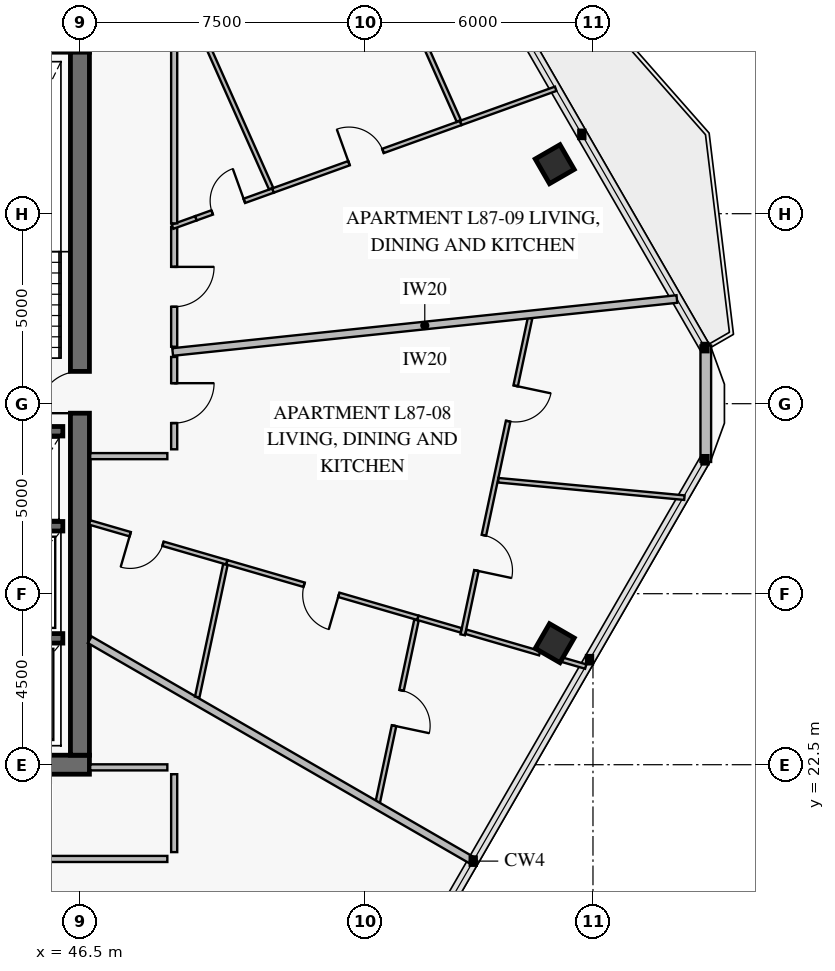
"""IFC4 building model, lengths in metres.
Left out: names, types, materials, properties, quantities, classifications, styles, units other than length and angle.
Written with IfcOpenShell. Run it as: python <this file> out.ifc"""

import sys

from ifc_helpers import new_model, si_unit, direction, frame, frame_2d, origin, origin_2d, place, context, subcontext, project, spatial, rectangle, extrude, element, fill, save


model = new_model("IFC4")
c1 = context("Model", 3, precision=1e-05, world=origin(), true_north=direction((0.0, 1.0)))
c2 = subcontext(c1, "Body", "Model", "MODEL_VIEW")
j1 = project(units=[si_unit("LENGTHUNIT", "METRE"), si_unit("PLANEANGLEUNIT", "RADIAN")], contexts=[c1])
p1 = place(None, origin())
s1 = spatial("IfcSite", under=j1, at=p1, CompositionType="ELEMENT")
p2 = place(p1, origin())
s2 = spatial("IfcBuilding", under=s1, at=p2, CompositionType="ELEMENT")
p3 = place(p2, frame((0.0, 0.0, 342.4)))
s3 = spatial("IfcBuildingStorey", under=s2, at=p3, CompositionType="ELEMENT", Elevation=342.4)
p4 = place(p3, frame((37.35, 22.5, 0.0), z_axis=(0.0, 0.0, 1.0), x_axis=(1.0, 0.0, 0.0)))
e1 = element("IfcWall", 1, at=p4, inside=s3, PredefinedType="SHEAR", context=c2, shape_type="SweptSolid", body=[
    extrude(rectangle(XDim=9.4, YDim=0.5, at=frame_2d((4.7, 0.0))), origin(), (0.0, 0.0, 1.0), 3.8),
])
p5 = place(p4, frame((3.95, 0.0, 0.0)))
e2 = element("IfcOpeningElement", 2, at=p5, cuts=e1, PredefinedType="OPENING", context=c2, shape_type="SweptSolid", body=[
    extrude(rectangle(XDim=1.5, YDim=2.15, at=frame_2d((0.75, 1.075))), frame((0.0, 0.262, 0.0), z_axis=(0.0, -1.0, 0.0), x_axis=(1.0, 0.0, 0.0)), (0.0, 0.0, 1.0), 0.524),
])
p6 = place(p3, frame((46.75, 41.5, 0.0), z_axis=(0.0, 0.0, 1.0), x_axis=(-1.0, 0.0, 0.0)))
e3 = element("IfcWall", 3, at=p6, inside=s3, PredefinedType="SHEAR", context=c2, shape_type="SweptSolid", body=[
    extrude(rectangle(XDim=7.8, YDim=0.5, at=frame_2d((3.9, 0.0))), origin(), (0.0, 0.0, 1.0), 3.8),
])
p7 = place(p3, frame((46.5, 22.75, 0.0), z_axis=(0.0, 0.0, 1.0), x_axis=(0.0, 1.0, 0.0)))
e4 = element("IfcWall", 4, at=p7, inside=s3, PredefinedType="SHEAR", context=c2, shape_type="SweptSolid", body=[
    extrude(rectangle(XDim=18.5, YDim=0.5, at=frame_2d((9.25, 0.0))), origin(), (0.0, 0.0, 1.0), 3.8),
])
p8 = place(p7, frame((9.0, 0.0, 0.0)))
e5 = element("IfcOpeningElement", 5, at=p8, cuts=e4, PredefinedType="OPENING", context=c2, shape_type="SweptSolid", body=[
    extrude(rectangle(XDim=1.1, YDim=2.15, at=frame_2d((0.55, 1.075))), frame((0.0, 0.262, 0.0), z_axis=(0.0, -1.0, 0.0), x_axis=(1.0, 0.0, 0.0)), (0.0, 0.0, 1.0), 0.524),
])
for number, where, z_axis, x_axis in (
    (6, (58.993, 38.302, 0.0), (0.0, 0.0, 1.0), (-0.5, 0.866, 0.0)),
    (7, (58.993, 25.698, 0.0), (0.0, 0.0, 1.0), (0.5, 0.866, 0.0)),
):
    element("IfcColumn", number, at=place(p3, frame(where, z_axis=z_axis, x_axis=x_axis)), inside=s3, PredefinedType="COLUMN", context=c2, shape_type="SweptSolid", body=[
        extrude(rectangle(XDim=0.75, YDim=0.75, at=origin_2d()), origin(), (0.0, 0.0, 1.0), 3.55),
    ])
p9 = place(p3, frame((62.969, 33.532, 0.0), z_axis=(0.0, 0.0, 1.0), x_axis=(0.0, -1.0, 0.0)))
e8 = element("IfcWall", 8, at=p9, inside=s3, PredefinedType="SOLIDWALL", context=c2, shape_type="SweptSolid", body=[
    extrude(rectangle(XDim=3.065, YDim=0.28, at=frame_2d((1.532, 0.0))), origin(), (0.0, 0.0, 1.0), 3.55),
])
p10 = place(p3, frame((25.95, 31.275, 0.0), z_axis=(0.0, 0.0, 1.0), x_axis=(1.0, 0.0, 0.0)))
e9 = element("IfcWall", 9, at=p10, inside=s3, PredefinedType="SOLIDWALL", context=c2, shape_type="SweptSolid", body=[
    extrude(rectangle(XDim=20.1, YDim=0.25, at=frame_2d((10.05, 0.0))), origin(), (0.0, 0.0, 1.0), 3.8),
])
p11 = place(p10, frame((2.6, 0.0, 0.0)))
e10 = element("IfcOpeningElement", 10, at=p11, cuts=e9, PredefinedType="OPENING", context=c2, shape_type="SweptSolid", body=[
    extrude(rectangle(XDim=1.1, YDim=2.15, at=frame_2d((0.55, 1.075))), frame((0.0, 0.137, 0.0), z_axis=(0.0, -1.0, 0.0), x_axis=(1.0, 0.0, 0.0)), (0.0, 0.0, 1.0), 0.274),
])
p12 = place(p10, frame((10.6, 0.0, 0.0)))
e11 = element("IfcOpeningElement", 11, at=p12, cuts=e9, PredefinedType="OPENING", context=c2, shape_type="SweptSolid", body=[
    extrude(rectangle(XDim=1.1, YDim=2.15, at=frame_2d((0.55, 1.075))), frame((0.0, 0.137, 0.0), z_axis=(0.0, -1.0, 0.0), x_axis=(1.0, 0.0, 0.0)), (0.0, 0.0, 1.0), 0.274),
])
p13 = place(p10, frame((16.35, 0.0, 0.0)))
e12 = element("IfcOpeningElement", 12, at=p13, cuts=e9, PredefinedType="OPENING", context=c2, shape_type="SweptSolid", body=[
    extrude(rectangle(XDim=1.1, YDim=2.15, at=frame_2d((0.55, 1.075))), frame((0.0, 0.137, 0.0), z_axis=(0.0, -1.0, 0.0), x_axis=(1.0, 0.0, 0.0)), (0.0, 0.0, 1.0), 0.274),
])
for number, where, z_axis, x_axis in (
    (13, (43.8, 25.825, 0.0), (0.0, 0.0, 1.0), (1.0, 0.0, 0.0)),
    (14, (43.8, 28.775, 0.0), (0.0, 0.0, 1.0), (1.0, 0.0, 0.0)),
):
    element("IfcWall", number, at=place(p3, frame(where, z_axis=z_axis, x_axis=x_axis)), inside=s3, PredefinedType="SOLIDWALL", context=c2, shape_type="SweptSolid", body=[
        extrude(rectangle(XDim=2.25, YDim=0.25, at=frame_2d((1.125, 0.0))), origin(), (0.0, 0.0, 1.0), 3.8),
    ])
p14 = place(p3, frame((41.356, 20.02, 0.0), z_axis=(0.0, 0.0, 1.0), x_axis=(1.0, 0.0, 0.0)))
e15 = element("IfcWall", 15, at=p14, inside=s3, PredefinedType="PARTITIONING", context=c2, shape_type="SweptSolid", body=[
    extrude(rectangle(XDim=7.444, YDim=0.16, at=frame_2d((3.722, 0.0))), origin(), (0.0, 0.0, 1.0), 3.0),
])
p15 = place(p14, frame((3.147, 0.0, 0.0)))
e16 = element("IfcOpeningElement", 16, at=p15, cuts=e15, PredefinedType="OPENING", context=c2, shape_type="SweptSolid", body=[
    extrude(rectangle(XDim=1.15, YDim=2.2, at=frame_2d((0.575, 1.1))), frame((0.0, 0.092, 0.0), z_axis=(0.0, -1.0, 0.0), x_axis=(1.0, 0.0, 0.0)), (0.0, 0.0, 1.0), 0.184),
])
p16 = place(p3, frame((56.573, 25.919, 0.0), z_axis=(0.0, 0.0, 1.0), x_axis=(0.207884804538, 0.978153315203, 0.0)))
e17 = element("IfcWall", 17, at=p16, inside=s3, PredefinedType="PARTITIONING", context=c2, shape_type="SweptSolid", body=[
    extrude(rectangle(XDim=8.519, YDim=0.12, at=frame_2d((4.26, 0.0))), origin(), (0.0, 0.0, 1.0), 3.0),
])
p17 = place(p16, frame((1.728, 0.0, 0.0)))
e18 = element("IfcOpeningElement", 18, at=p17, cuts=e17, PredefinedType="OPENING", context=c2, shape_type="SweptSolid", body=[
    extrude(rectangle(XDim=0.95, YDim=2.1, at=frame_2d((0.475, 1.05))), frame((0.0, 0.072, 0.0), z_axis=(0.0, -1.0, 0.0), x_axis=(1.0, 0.0, 0.0)), (0.0, 0.0, 1.0), 0.144),
])
p18 = place(p16, frame((5.747, 0.0, 0.0)))
e19 = element("IfcOpeningElement", 19, at=p18, cuts=e17, PredefinedType="OPENING", context=c2, shape_type="SweptSolid", body=[
    extrude(rectangle(XDim=0.95, YDim=2.1, at=frame_2d((0.475, 1.05))), frame((0.0, 0.072, 0.0), z_axis=(0.0, -1.0, 0.0), x_axis=(1.0, 0.0, 0.0)), (0.0, 0.0, 1.0), 0.144),
])
p19 = place(p3, frame((46.758, 28.875, 0.0), z_axis=(0.0, 0.0, 1.0), x_axis=(0.960290635707, -0.279001603891, 0.0)))
e20 = element("IfcWall", 20, at=p19, inside=s3, PredefinedType="PARTITIONING", context=c2, shape_type="SweptSolid", body=[
    extrude(rectangle(XDim=3.757, YDim=0.12, at=frame_2d((1.878, 0.0))), origin(), (0.0, 0.0, 1.0), 3.0),
])
p20 = place(p19, frame((1.108, 0.0, 0.0)))
e21 = element("IfcOpeningElement", 21, at=p20, cuts=e20, PredefinedType="OPENING", context=c2, shape_type="SweptSolid", body=[
    extrude(rectangle(XDim=0.9, YDim=2.1, at=frame_2d((0.45, 1.05))), frame((0.0, 0.072, 0.0), z_axis=(0.0, -1.0, 0.0), x_axis=(1.0, 0.0, 0.0)), (0.0, 0.0, 1.0), 0.144),
])
p21 = place(p3, frame((50.365, 27.826, 0.0), z_axis=(0.0, 0.0, 1.0), x_axis=(0.960293456694, -0.278991894201, 0.0)))
e22 = element("IfcWall", 22, at=p21, inside=s3, PredefinedType="PARTITIONING", context=c2, shape_type="SweptSolid", body=[
    extrude(rectangle(XDim=5.237, YDim=0.12, at=frame_2d((2.618, 0.0))), origin(), (0.0, 0.0, 1.0), 3.2),
])
p22 = place(p21, frame((2.118, 0.0, 0.0)))
e23 = element("IfcOpeningElement", 23, at=p22, cuts=e22, PredefinedType="OPENING", context=c2, shape_type="SweptSolid", body=[
    extrude(rectangle(XDim=0.95, YDim=2.1, at=frame_2d((0.475, 1.05))), frame((0.0, 0.072, 0.0), z_axis=(0.0, -1.0, 0.0), x_axis=(1.0, 0.0, 0.0)), (0.0, 0.0, 1.0), 0.144),
])
p23 = place(p3, frame((54.336, 21.511, 0.0), z_axis=(0.0, 0.0, 1.0), x_axis=(0.207920104204, 0.978145812376, 0.0)))
e24 = element("IfcWall", 24, at=p23, inside=s3, PredefinedType="PARTITIONING", context=c2, shape_type="SweptSolid", body=[
    extrude(rectangle(XDim=4.902, YDim=0.12, at=frame_2d((2.451, 0.0))), origin(), (0.0, 0.0, 1.0), 3.55),
])
p24 = place(p23, frame((2.06, 0.0, 0.0)))
e25 = element("IfcOpeningElement", 25, at=p24, cuts=e24, PredefinedType="OPENING", context=c2, shape_type="SweptSolid", body=[
    extrude(rectangle(XDim=0.95, YDim=2.1, at=frame_2d((0.475, 1.05))), frame((0.0, 0.072, 0.0), z_axis=(0.0, -1.0, 0.0), x_axis=(1.0, 0.0, 0.0)), (0.0, 0.0, 1.0), 0.144),
])
p25 = place(p3, frame((48.98, 30.8, 0.0), z_axis=(0.0, 0.0, 1.0), x_axis=(0.0, 1.0, 0.0)))
e26 = element("IfcWall", 26, at=p25, inside=s3, PredefinedType="PARTITIONING", context=c2, shape_type="SweptSolid", body=[
    extrude(rectangle(XDim=2.43, YDim=0.16, at=frame_2d((1.215, 0.0))), origin(), (0.0, 0.0, 1.0), 3.55),
])
p26 = place(p25, frame((0.69, 0.0, 0.0)))
e27 = element("IfcOpeningElement", 27, at=p26, cuts=e26, PredefinedType="OPENING", context=c2, shape_type="SweptSolid", body=[
    extrude(rectangle(XDim=1.05, YDim=2.15, at=frame_2d((0.525, 1.075))), frame((0.0, 0.092, 0.0), z_axis=(0.0, -1.0, 0.0), x_axis=(1.0, 0.0, 0.0)), (0.0, 0.0, 1.0), 0.184),
])
p27 = place(p3, frame((49.55, 36.878, 0.0), z_axis=(0.0, 0.0, 1.0), x_axis=(0.940904714612, 0.338671401244, 0.0)))
e28 = element("IfcWall", 28, at=p27, inside=s3, PredefinedType="PARTITIONING", context=c2, shape_type="SweptSolid", body=[
    extrude(rectangle(XDim=2.158, YDim=0.12, at=frame_2d((1.079, 0.0))), origin(), (0.0, 0.0, 1.0), 3.55),
])
p28 = place(p27, frame((0.457, 0.0, 0.0)))
e29 = element("IfcOpeningElement", 29, at=p28, cuts=e28, PredefinedType="OPENING", context=c2, shape_type="SweptSolid", body=[
    extrude(rectangle(XDim=0.9, YDim=2.1, at=frame_2d((0.45, 1.05))), frame((0.0, 0.072, 0.0), z_axis=(0.0, -1.0, 0.0), x_axis=(1.0, 0.0, 0.0)), (0.0, 0.0, 1.0), 0.144),
])
p29 = place(p3, frame((51.581, 37.609, 0.0), z_axis=(0.0, 0.0, 1.0), x_axis=(0.940870812365, 0.338765574461, 0.0)))
e30 = element("IfcWall", 30, at=p29, inside=s3, PredefinedType="PARTITIONING", context=c2, shape_type="SweptSolid", body=[
    extrude(rectangle(XDim=5.25, YDim=0.12, at=frame_2d((2.625, 0.0))), origin(), (0.0, 0.0, 1.0), 3.2),
])
p30 = place(p29, frame((2.125, 0.0, 0.0)))
e31 = element("IfcOpeningElement", 31, at=p30, cuts=e30, PredefinedType="OPENING", context=c2, shape_type="SweptSolid", body=[
    extrude(rectangle(XDim=0.95, YDim=2.1, at=frame_2d((0.475, 1.05))), frame((0.0, 0.072, 0.0), z_axis=(0.0, -1.0, 0.0), x_axis=(1.0, 0.0, 0.0)), (0.0, 0.0, 1.0), 0.144),
])
p31 = place(p3, frame((56.469, 39.442, 0.0), z_axis=(0.0, 0.0, 1.0), x_axis=(-0.406736554193, 0.913545497216, 0.0)))
e32 = element("IfcWall", 32, at=p31, inside=s3, PredefinedType="PARTITIONING", context=c2, shape_type="SweptSolid", body=[
    extrude(rectangle(XDim=8.483, YDim=0.12, at=frame_2d((4.241, 0.0))), origin(), (0.0, 0.0, 1.0), 3.55),
])
p32 = place(p31, frame((2.362, 0.0, 0.0)))
e33 = element("IfcOpeningElement", 33, at=p32, cuts=e32, PredefinedType="OPENING", context=c2, shape_type="SweptSolid", body=[
    extrude(rectangle(XDim=0.95, YDim=2.1, at=frame_2d((0.475, 1.05))), frame((0.0, 0.072, 0.0), z_axis=(0.0, -1.0, 0.0), x_axis=(1.0, 0.0, 0.0)), (0.0, 0.0, 1.0), 0.144),
])
p33 = place(p3, frame((48.98, 33.499, 0.0), z_axis=(0.0, 0.0, 1.0), x_axis=(0.0, 1.0, 0.0)))
e34 = element("IfcWall", 34, at=p33, inside=s3, PredefinedType="PARTITIONING", context=c2, shape_type="SweptSolid", body=[
    extrude(rectangle(XDim=3.153, YDim=0.16, at=frame_2d((1.576, 0.0))), origin(), (0.0, 0.0, 1.0), 3.0),
])
p34 = place(p33, frame((1.052, 0.0, 0.0)))
e35 = element("IfcOpeningElement", 35, at=p34, cuts=e34, PredefinedType="OPENING", context=c2, shape_type="SweptSolid", body=[
    extrude(rectangle(XDim=1.05, YDim=2.15, at=frame_2d((0.525, 1.075))), frame((0.0, 0.092, 0.0), z_axis=(0.0, -1.0, 0.0), x_axis=(1.0, 0.0, 0.0)), (0.0, 0.0, 1.0), 0.184),
])
p35 = place(p3, frame((41.373, 19.932, 0.0), z_axis=(0.0, 0.0, 1.0), x_axis=(0.406736471648, -0.913545533967, 0.0)))
e36 = element("IfcWall", 36, at=p35, inside=s3, PredefinedType="PARTITIONING", context=c2, shape_type="SweptSolid", body=[
    extrude(rectangle(XDim=13.142, YDim=0.2, at=frame_2d((6.571, 0.0))), origin(), (0.0, 0.0, 1.0), 2.97),
])
p36 = place(p3, frame((46.758, 25.789, 0.0), z_axis=(0.0, 0.0, 1.0), x_axis=(0.866025778731, -0.499999350573, 0.0)))
e37 = element("IfcWall", 37, at=p36, inside=s3, PredefinedType="PARTITIONING", context=c2, shape_type="SweptSolid", body=[
    extrude(rectangle(XDim=11.652, YDim=0.2, at=frame_2d((5.826, 0.0))), origin(), (0.0, 0.0, 1.0), 2.97),
])
p37 = place(p3, frame((57.507, 29.986, 0.0), z_axis=(0.0, 0.0, 1.0), x_axis=(0.995643444517, -0.093242326169, 0.0)))
e38 = element("IfcWall", 38, at=p37, inside=s3, PredefinedType="PARTITIONING", context=c2, shape_type="SweptSolid", body=[
    extrude(rectangle(XDim=4.92, YDim=0.12, at=frame_2d((2.46, 0.0))), origin(), (0.0, 0.0, 1.0), 2.97),
])
p38 = place(p3, frame((55.394, 26.365, 0.0), z_axis=(0.0, 0.0, 1.0), x_axis=(0.960281932935, -0.279031556062, 0.0)))
e39 = element("IfcWall", 39, at=p38, inside=s3, PredefinedType="PARTITIONING", context=c2, shape_type="SweptSolid", body=[
    extrude(rectangle(XDim=1.181, YDim=0.12, at=frame_2d((0.591, 0.0))), origin(), (0.0, 0.0, 1.0), 3.55),
])
p39 = place(p3, frame((56.659, 25.998, 0.0), z_axis=(0.0, 0.0, 1.0), x_axis=(0.960282504677, -0.279029588417, 0.0)))
e40 = element("IfcWall", 40, at=p39, inside=s3, PredefinedType="PARTITIONING", context=c2, shape_type="SweptSolid", body=[
    extrude(rectangle(XDim=2.02, YDim=0.12, at=frame_2d((1.01, 0.0))), origin(), (0.0, 0.0, 1.0), 3.55),
])
p40 = place(p3, frame((59.052, 25.302, 0.0), z_axis=(0.0, 0.0, 1.0), x_axis=(0.960370297506, -0.278727271124, 0.0)))
e41 = element("IfcWall", 41, at=p40, inside=s3, PredefinedType="PARTITIONING", context=c2, shape_type="SweptSolid", body=[
    extrude(rectangle(XDim=0.788, YDim=0.12, at=frame_2d((0.394, 0.0))), origin(), (0.0, 0.0, 1.0), 3.55),
])
p41 = place(p3, frame((49.586, 24.281, 0.0), z_axis=(0.0, 0.0, 1.0), x_axis=(0.207984930921, 0.978132030203, 0.0)))
e42 = element("IfcWall", 42, at=p41, inside=s3, PredefinedType="PARTITIONING", context=c2, shape_type="SweptSolid", body=[
    extrude(rectangle(XDim=3.564, YDim=0.12, at=frame_2d((1.782, 0.0))), origin(), (0.0, 0.0, 1.0), 3.55),
])
p42 = place(p3, frame((48.94, 33.36, 0.0), z_axis=(0.0, 0.0, 1.0), x_axis=(0.994521885418, 0.104528557935, 0.0)))
e43 = element("IfcWall", 43, at=p42, inside=s3, PredefinedType="PARTITIONING", context=c2, shape_type="SweptSolid", body=[
    extrude(rectangle(XDim=13.341, YDim=0.2, at=frame_2d((6.67, 0.0))), origin(), (0.0, 0.0, 1.0), 2.97),
])
p43 = place(p3, frame((48.937, 36.657, 0.0), z_axis=(0.0, 0.0, 1.0), x_axis=(0.940849224184, 0.338825526417, 0.0)))
e44 = element("IfcWall", 44, at=p43, inside=s3, PredefinedType="PARTITIONING", context=c2, shape_type="SweptSolid", body=[
    extrude(rectangle(XDim=0.652, YDim=0.12, at=frame_2d((0.326, 0.0))), origin(), (0.0, 0.0, 1.0), 3.55),
])
p44 = place(p3, frame((56.521, 39.388, 0.0), z_axis=(0.0, 0.0, 1.0), x_axis=(0.940883895468, 0.338729235894, 0.0)))
e45 = element("IfcWall", 45, at=p44, inside=s3, PredefinedType="PARTITIONING", context=c2, shape_type="SweptSolid", body=[
    extrude(rectangle(XDim=2.655, YDim=0.12, at=frame_2d((1.328, 0.0))), origin(), (0.0, 0.0, 1.0), 2.97),
])
p45 = place(p3, frame((51.53, 37.663, 0.0), z_axis=(0.0, 0.0, 1.0), x_axis=(-0.406732154443, 0.913547456097, 0.0)))
e46 = element("IfcWall", 46, at=p45, inside=s3, PredefinedType="PARTITIONING", context=c2, shape_type="SweptSolid", body=[
    extrude(rectangle(XDim=6.447, YDim=0.12, at=frame_2d((3.224, 0.0))), origin(), (0.0, 0.0, 1.0), 3.55),
])
p46 = place(p3, frame((48.98, 20.2, 0.0), z_axis=(0.0, 0.0, 1.0), x_axis=(0.0, 1.0, 0.0)))
e47 = element("IfcWall", 47, at=p46, inside=s3, PredefinedType="PARTITIONING", context=c2, shape_type="SweptSolid", body=[
    extrude(rectangle(XDim=2.05, YDim=0.16, at=frame_2d((1.025, 0.0))), origin(), (0.0, 0.0, 1.0), 3.55),
])
for number, where, z_axis, x_axis in (
    (48, (48.8, 22.43, 0.0), (0.0, 0.0, 1.0), (-1.0, 0.0, 0.0)),
    (49, (46.77, 30.62, 0.0), (0.0, 0.0, 1.0), (1.0, 0.0, 0.0)),
):
    element("IfcWall", number, at=place(p3, frame(where, z_axis=z_axis, x_axis=x_axis)), inside=s3, PredefinedType="PARTITIONING", context=c2, shape_type="SweptSolid", body=[
        extrude(rectangle(XDim=2.03, YDim=0.16, at=frame_2d((1.015, 0.0))), origin(), (0.0, 0.0, 1.0), 3.55),
    ])
p47 = place(p3, frame((48.98, 36.745, 0.0), z_axis=(0.0, 0.0, 1.0), x_axis=(0.0, 1.0, 0.0)))
e50 = element("IfcWall", 50, at=p47, inside=s3, PredefinedType="PARTITIONING", context=c2, shape_type="SweptSolid", body=[
    extrude(rectangle(XDim=6.477, YDim=0.16, at=frame_2d((3.238, 0.0))), origin(), (0.0, 0.0, 1.0), 3.55),
])
p48 = place(p8, origin())
e51 = element("IfcDoor", 51, at=p48, inside=s3, OperationType="SINGLE_SWING_LEFT", PredefinedType="USERDEFINED", context=c2, shape_type="SweptSolid", body=[
    extrude(rectangle(XDim=1.1, YDim=2.15, at=frame_2d((0.55, 1.075))), frame((0.0, 0.025, 0.0), z_axis=(0.0, -1.0, 0.0), x_axis=(1.0, 0.0, 0.0)), (0.0, 0.0, 1.0), 0.05),
])
fill(e5, e51)
p49 = place(p17, frame((0.95, 0.0, 0.0), z_axis=(0.0, 0.0, 1.0), x_axis=(-1.0, 0.0, 0.0)))
e52 = element("IfcDoor", 52, at=p49, inside=s3, OperationType="SINGLE_SWING_RIGHT", PredefinedType="DOOR", context=c2, shape_type="SweptSolid", body=[
    extrude(rectangle(XDim=0.95, YDim=2.1, at=frame_2d((0.475, 1.05))), frame((0.0, 0.025, 0.0), z_axis=(0.0, -1.0, 0.0), x_axis=(1.0, 0.0, 0.0)), (0.0, 0.0, 1.0), 0.05),
])
fill(e18, e52)
p50 = place(p18, frame((0.95, 0.0, 0.0), z_axis=(0.0, 0.0, 1.0), x_axis=(-1.0, 0.0, 0.0)))
e53 = element("IfcDoor", 53, at=p50, inside=s3, OperationType="SINGLE_SWING_LEFT", PredefinedType="DOOR", context=c2, shape_type="SweptSolid", body=[
    extrude(rectangle(XDim=0.95, YDim=2.1, at=frame_2d((0.475, 1.05))), frame((0.0, 0.025, 0.0), z_axis=(0.0, -1.0, 0.0), x_axis=(1.0, 0.0, 0.0)), (0.0, 0.0, 1.0), 0.05),
])
fill(e19, e53)
p51 = place(p20, frame((0.9, 0.0, 0.0), z_axis=(0.0, 0.0, 1.0), x_axis=(-1.0, 0.0, 0.0)))
e54 = element("IfcDoor", 54, at=p51, inside=s3, OperationType="SINGLE_SWING_RIGHT", PredefinedType="DOOR", context=c2, shape_type="SweptSolid", body=[
    extrude(rectangle(XDim=0.9, YDim=2.1, at=frame_2d((0.45, 1.05))), frame((0.0, 0.025, 0.0), z_axis=(0.0, -1.0, 0.0), x_axis=(1.0, 0.0, 0.0)), (0.0, 0.0, 1.0), 0.05),
])
fill(e21, e54)
p52 = place(p22, frame((0.95, 0.0, 0.0), z_axis=(0.0, 0.0, 1.0), x_axis=(-1.0, 0.0, 0.0)))
e55 = element("IfcDoor", 55, at=p52, inside=s3, OperationType="SINGLE_SWING_LEFT", PredefinedType="DOOR", context=c2, shape_type="SweptSolid", body=[
    extrude(rectangle(XDim=0.95, YDim=2.1, at=frame_2d((0.475, 1.05))), frame((0.0, 0.025, 0.0), z_axis=(0.0, -1.0, 0.0), x_axis=(1.0, 0.0, 0.0)), (0.0, 0.0, 1.0), 0.05),
])
fill(e23, e55)
p53 = place(p24, frame((0.95, 0.0, 0.0), z_axis=(0.0, 0.0, 1.0), x_axis=(-1.0, 0.0, 0.0)))
e56 = element("IfcDoor", 56, at=p53, inside=s3, OperationType="SINGLE_SWING_RIGHT", PredefinedType="DOOR", context=c2, shape_type="SweptSolid", body=[
    extrude(rectangle(XDim=0.95, YDim=2.1, at=frame_2d((0.475, 1.05))), frame((0.0, 0.025, 0.0), z_axis=(0.0, -1.0, 0.0), x_axis=(1.0, 0.0, 0.0)), (0.0, 0.0, 1.0), 0.05),
])
fill(e25, e56)
p54 = place(p26, frame((1.05, 0.0, 0.0), z_axis=(0.0, 0.0, 1.0), x_axis=(-1.0, 0.0, 0.0)))
e57 = element("IfcDoor", 57, at=p54, inside=s3, OperationType="SINGLE_SWING_LEFT", PredefinedType="DOOR", context=c2, shape_type="SweptSolid", body=[
    extrude(rectangle(XDim=1.05, YDim=2.15, at=frame_2d((0.525, 1.075))), frame((0.0, 0.025, 0.0), z_axis=(0.0, -1.0, 0.0), x_axis=(1.0, 0.0, 0.0)), (0.0, 0.0, 1.0), 0.05),
])
fill(e27, e57)
p55 = place(p28, origin())
e58 = element("IfcDoor", 58, at=p55, inside=s3, OperationType="SINGLE_SWING_RIGHT", PredefinedType="DOOR", context=c2, shape_type="SweptSolid", body=[
    extrude(rectangle(XDim=0.9, YDim=2.1, at=frame_2d((0.45, 1.05))), frame((0.0, 0.025, 0.0), z_axis=(0.0, -1.0, 0.0), x_axis=(1.0, 0.0, 0.0)), (0.0, 0.0, 1.0), 0.05),
])
fill(e29, e58)
p56 = place(p30, origin())
e59 = element("IfcDoor", 59, at=p56, inside=s3, OperationType="SINGLE_SWING_LEFT", PredefinedType="DOOR", context=c2, shape_type="SweptSolid", body=[
    extrude(rectangle(XDim=0.95, YDim=2.1, at=frame_2d((0.475, 1.05))), frame((0.0, 0.025, 0.0), z_axis=(0.0, -1.0, 0.0), x_axis=(1.0, 0.0, 0.0)), (0.0, 0.0, 1.0), 0.05),
])
fill(e31, e59)
p57 = place(p34, frame((1.05, 0.0, 0.0), z_axis=(0.0, 0.0, 1.0), x_axis=(-1.0, 0.0, 0.0)))
e60 = element("IfcDoor", 60, at=p57, inside=s3, OperationType="SINGLE_SWING_LEFT", PredefinedType="DOOR", context=c2, shape_type="SweptSolid", body=[
    extrude(rectangle(XDim=1.05, YDim=2.15, at=frame_2d((0.525, 1.075))), frame((0.0, 0.025, 0.0), z_axis=(0.0, -1.0, 0.0), x_axis=(1.0, 0.0, 0.0)), (0.0, 0.0, 1.0), 0.05),
])
fill(e35, e60)
save(model, sys.argv[1])
